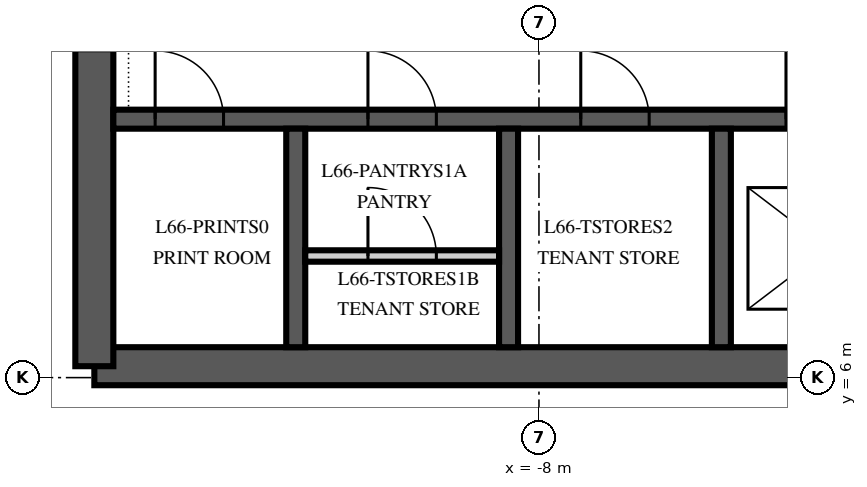
"""IFC4 building model, lengths in metres.
Left out: names, types, materials, properties, quantities, classifications, styles, units other than length and angle.
Written with IfcOpenShell. Run it as: python <this file> out.ifc"""

import sys

from ifc_helpers import new_model, si_unit, direction, frame, frame_2d, origin, place, context, subcontext, project, spatial, polyline, rectangle, outline, extrude, element, fill, save


model = new_model("IFC4")
c1 = context("Model", 3, precision=1e-05, world=origin(), true_north=direction((0.0, 1.0)))
c2 = subcontext(c1, "Body", "Model", "MODEL_VIEW")
j1 = project(units=[si_unit("LENGTHUNIT", "METRE"), si_unit("PLANEANGLEUNIT", "RADIAN")], contexts=[c1])
p1 = place(None, origin())
s1 = spatial("IfcSite", under=j1, at=p1, CompositionType="ELEMENT")
p2 = place(p1, origin())
s2 = spatial("IfcBuilding", under=s1, at=p2, CompositionType="ELEMENT")
p3 = place(p2, frame((0.0, 0.0, 284.0)))
s3 = spatial("IfcBuildingStorey", under=s2, at=p3, CompositionType="ELEMENT", Elevation=284.0)
p4 = place(p3, frame((-13.85, 6.15, 0.0), z_axis=(0.0, 0.0, 1.0), x_axis=(1.0, 0.0, 0.0)))
e1 = element("IfcWall", 1, at=p4, inside=s3, PredefinedType="SHEAR", context=c2, shape_type="SweptSolid", body=[
    extrude(rectangle(XDim=27.7, YDim=0.5, at=frame_2d((13.85, 0.0))), origin(), (0.0, 0.0, 1.0), 4.0),
])
p5 = place(p3, frame((-13.85, 23.85, 0.0), z_axis=(0.0, 0.0, 1.0), x_axis=(0.0, -1.0, 0.0)))
e2 = element("IfcWall", 2, at=p5, inside=s3, PredefinedType="SHEAR", context=c2, shape_type="SweptSolid", body=[
    extrude(outline(polyline([(0.0, -0.25), (17.7, -0.25), (17.7, 0.0), (17.45, 0.0), (17.45, 0.25), (0.25, 0.25), (0.25, 0.0), (0.0, 0.0), (0.0, -0.25)])), origin(), (0.0, 0.0, 1.0), 4.0),
])
p6 = place(p5, frame((11.75, 0.0, 0.0)))
e3 = element("IfcOpeningElement", 3, at=p6, cuts=e2, PredefinedType="OPENING", context=c2, shape_type="SweptSolid", body=[
    extrude(rectangle(XDim=1.8, YDim=2.4, at=frame_2d((0.9, 1.2))), frame((0.0, 0.265, 0.0), z_axis=(0.0, -1.0, 0.0), x_axis=(1.0, 0.0, 0.0)), (0.0, 0.0, 1.0), 0.53),
])
p7 = place(p3, frame((-13.6, 9.4, 0.0), z_axis=(0.0, 0.0, 1.0), x_axis=(1.0, 0.0, 0.0)))
e4 = element("IfcWall", 4, at=p7, inside=s3, PredefinedType="SHEAR", context=c2, shape_type="SweptSolid", body=[
    extrude(rectangle(XDim=27.2, YDim=0.25, at=frame_2d((13.6, 0.0))), origin(), (0.0, 0.0, 1.0), 4.0),
])
p8 = place(p7, frame((8.85, 0.0, 0.0)))
e5 = element("IfcOpeningElement", 5, at=p8, cuts=e4, PredefinedType="OPENING", context=c2, shape_type="SweptSolid", body=[
    extrude(rectangle(XDim=1.1, YDim=2.1, at=frame_2d((0.55, 1.05))), frame((0.0, 0.14, 0.0), z_axis=(0.0, -1.0, 0.0), x_axis=(1.0, 0.0, 0.0)), (0.0, 0.0, 1.0), 0.28),
])
p9 = place(p7, frame((11.65, 0.0, 0.0)))
e6 = element("IfcOpeningElement", 6, at=p9, cuts=e4, PredefinedType="OPENING", context=c2, shape_type="SweptSolid", body=[
    extrude(rectangle(XDim=1.1, YDim=2.1, at=frame_2d((0.55, 1.05))), frame((0.0, 0.14, 0.0), z_axis=(0.0, -1.0, 0.0), x_axis=(1.0, 0.0, 0.0)), (0.0, 0.0, 1.0), 0.28),
])
p10 = place(p7, frame((14.45, 0.0, 0.0)))
e7 = element("IfcOpeningElement", 7, at=p10, cuts=e4, PredefinedType="OPENING", context=c2, shape_type="SweptSolid", body=[
    extrude(rectangle(XDim=1.1, YDim=2.1, at=frame_2d((0.55, 1.05))), frame((0.0, 0.14, 0.0), z_axis=(0.0, -1.0, 0.0), x_axis=(1.0, 0.0, 0.0)), (0.0, 0.0, 1.0), 0.28),
])
p11 = place(p7, frame((0.55, 0.0, 0.0)))
e8 = element("IfcOpeningElement", 8, at=p11, cuts=e4, PredefinedType="OPENING", context=c2, shape_type="SweptSolid", body=[
    extrude(rectangle(XDim=0.9, YDim=2.1, at=frame_2d((0.45, 1.05))), frame((0.0, 0.14, 0.0), z_axis=(0.0, -1.0, 0.0), x_axis=(1.0, 0.0, 0.0)), (0.0, 0.0, 1.0), 0.28),
])
p12 = place(p7, frame((3.35, 0.0, 0.0)))
e9 = element("IfcOpeningElement", 9, at=p12, cuts=e4, PredefinedType="OPENING", context=c2, shape_type="SweptSolid", body=[
    extrude(rectangle(XDim=0.9, YDim=2.1, at=frame_2d((0.45, 1.05))), frame((0.0, 0.14, 0.0), z_axis=(0.0, -1.0, 0.0), x_axis=(1.0, 0.0, 0.0)), (0.0, 0.0, 1.0), 0.28),
])
p13 = place(p7, frame((6.15, 0.0, 0.0)))
e10 = element("IfcOpeningElement", 10, at=p13, cuts=e4, PredefinedType="OPENING", context=c2, shape_type="SweptSolid", body=[
    extrude(rectangle(XDim=0.9, YDim=2.1, at=frame_2d((0.45, 1.05))), frame((0.0, 0.14, 0.0), z_axis=(0.0, -1.0, 0.0), x_axis=(1.0, 0.0, 0.0)), (0.0, 0.0, 1.0), 0.28),
])
p14 = place(p7, frame((17.35, 0.0, 0.0)))
e11 = element("IfcOpeningElement", 11, at=p14, cuts=e4, PredefinedType="OPENING", context=c2, shape_type="SweptSolid", body=[
    extrude(rectangle(XDim=0.9, YDim=2.1, at=frame_2d((0.45, 1.05))), frame((0.0, 0.14, 0.0), z_axis=(0.0, -1.0, 0.0), x_axis=(1.0, 0.0, 0.0)), (0.0, 0.0, 1.0), 0.28),
])
p15 = place(p7, frame((20.15, 0.0, 0.0)))
e12 = element("IfcOpeningElement", 12, at=p15, cuts=e4, PredefinedType="OPENING", context=c2, shape_type="SweptSolid", body=[
    extrude(rectangle(XDim=0.9, YDim=2.1, at=frame_2d((0.45, 1.05))), frame((0.0, 0.14, 0.0), z_axis=(0.0, -1.0, 0.0), x_axis=(1.0, 0.0, 0.0)), (0.0, 0.0, 1.0), 0.28),
])
p16 = place(p7, frame((22.95, 0.0, 0.0)))
e13 = element("IfcOpeningElement", 13, at=p16, cuts=e4, PredefinedType="OPENING", context=c2, shape_type="SweptSolid", body=[
    extrude(rectangle(XDim=0.9, YDim=2.1, at=frame_2d((0.45, 1.05))), frame((0.0, 0.14, 0.0), z_axis=(0.0, -1.0, 0.0), x_axis=(1.0, 0.0, 0.0)), (0.0, 0.0, 1.0), 0.28),
])
for number, where, z_axis, x_axis in (
    (14, (-11.2, 6.4, 0.0), (0.0, 0.0, 1.0), (0.0, 1.0, 0.0)),
    (15, (-8.4, 6.4, 0.0), (0.0, 0.0, 1.0), (0.0, 1.0, 0.0)),
    (16, (-5.6, 6.4, 0.0), (0.0, 0.0, 1.0), (0.0, 1.0, 0.0)),
):
    element("IfcWall", number, at=place(p3, frame(where, z_axis=z_axis, x_axis=x_axis)), inside=s3, PredefinedType="SHEAR", context=c2, shape_type="SweptSolid", body=[
        extrude(rectangle(XDim=2.875, YDim=0.25, at=frame_2d((1.438, 0.0))), origin(), (0.0, 0.0, 1.0), 4.0),
    ])
p17 = place(p3, frame((-11.075, 7.6, 0.0), z_axis=(0.0, 0.0, 1.0), x_axis=(1.0, 0.0, 0.0)))
e17 = element("IfcWall", 17, at=p17, inside=s3, PredefinedType="PARTITIONING", context=c2, shape_type="SweptSolid", body=[
    extrude(rectangle(XDim=2.55, YDim=0.15, at=frame_2d((1.275, 0.0))), origin(), (0.0, 0.0, 1.0), 3.85),
])
p18 = place(p17, frame((0.825, 0.0, 0.0)))
e18 = element("IfcOpeningElement", 18, at=p18, cuts=e17, PredefinedType="OPENING", context=c2, shape_type="SweptSolid", body=[
    extrude(rectangle(XDim=0.9, YDim=2.1, at=frame_2d((0.45, 1.05))), frame((0.0, 0.09, 0.0), z_axis=(0.0, -1.0, 0.0), x_axis=(1.0, 0.0, 0.0)), (0.0, 0.0, 1.0), 0.18),
])
p19 = place(p8, origin())
e19 = element("IfcDoor", 19, at=p19, inside=s3, OperationType="SLIDING_TO_LEFT", PredefinedType="DOOR", context=c2, shape_type="SweptSolid", body=[
    extrude(rectangle(XDim=1.1, YDim=2.1, at=frame_2d((0.55, 1.05))), frame((0.0, 0.125, 0.0), z_axis=(0.0, -1.0, 0.0), x_axis=(1.0, 0.0, 0.0)), (0.0, 0.0, 1.0), 0.25),
])
fill(e5, e19)
p20 = place(p11, origin())
e20 = element("IfcDoor", 20, at=p20, inside=s3, OperationType="SINGLE_SWING_LEFT", PredefinedType="DOOR", context=c2, shape_type="SweptSolid", body=[
    extrude(rectangle(XDim=0.9, YDim=2.1, at=frame_2d((0.45, 1.05))), frame((0.0, 0.125, 0.0), z_axis=(0.0, -1.0, 0.0), x_axis=(1.0, 0.0, 0.0)), (0.0, 0.0, 1.0), 0.25),
])
fill(e8, e20)
p21 = place(p12, origin())
e21 = element("IfcDoor", 21, at=p21, inside=s3, OperationType="SINGLE_SWING_LEFT", PredefinedType="DOOR", context=c2, shape_type="SweptSolid", body=[
    extrude(rectangle(XDim=0.9, YDim=2.1, at=frame_2d((0.45, 1.05))), frame((0.0, 0.125, 0.0), z_axis=(0.0, -1.0, 0.0), x_axis=(1.0, 0.0, 0.0)), (0.0, 0.0, 1.0), 0.25),
])
fill(e9, e21)
p22 = place(p18, origin())
e22 = element("IfcDoor", 22, at=p22, inside=s3, OperationType="SINGLE_SWING_LEFT", PredefinedType="DOOR", context=c2, shape_type="SweptSolid", body=[
    extrude(rectangle(XDim=0.9, YDim=2.1, at=frame_2d((0.45, 1.05))), frame((0.0, 0.075, 0.0), z_axis=(0.0, -1.0, 0.0), x_axis=(1.0, 0.0, 0.0)), (0.0, 0.0, 1.0), 0.149),
])
fill(e18, e22)
p23 = place(p13, origin())
e23 = element("IfcDoor", 23, at=p23, inside=s3, OperationType="SINGLE_SWING_LEFT", PredefinedType="DOOR", context=c2, shape_type="SweptSolid", body=[
    extrude(rectangle(XDim=0.9, YDim=2.1, at=frame_2d((0.45, 1.05))), frame((0.0, 0.125, 0.0), z_axis=(0.0, -1.0, 0.0), x_axis=(1.0, 0.0, 0.0)), (0.0, 0.0, 1.0), 0.25),
])
fill(e10, e23)
save(model, sys.argv[1])
